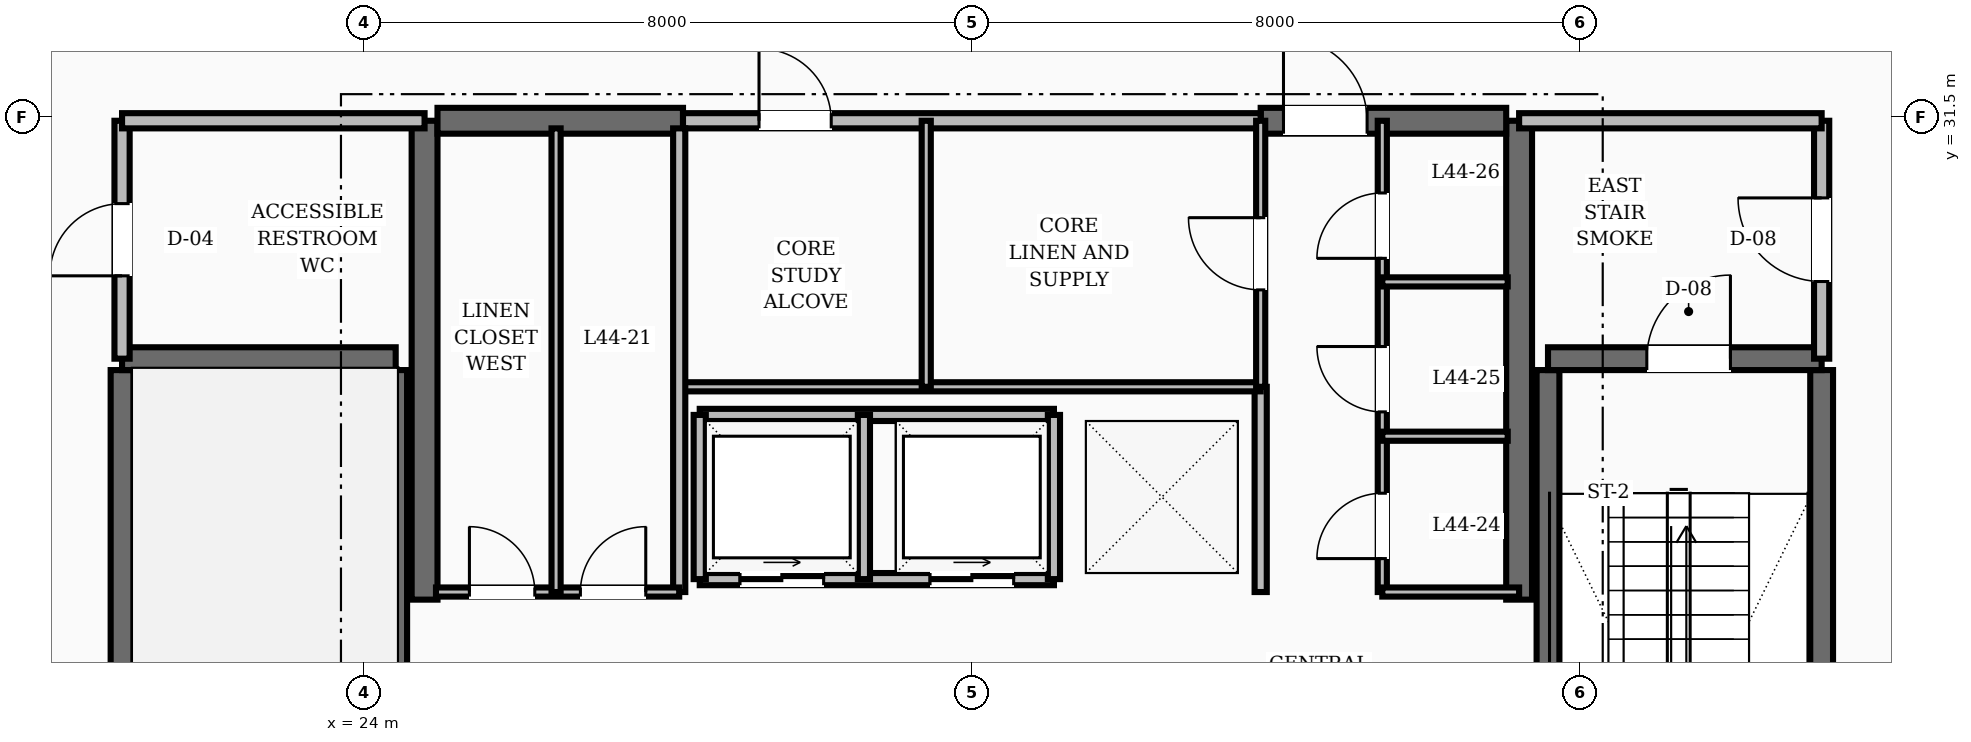
"""IFC4 building model, lengths in metres.
Left out: names, types, materials, properties, quantities, classifications, styles, units other than length and angle.
Written with IfcOpenShell. Run it as: python <this file> out.ifc"""

import sys

from ifc_helpers import new_model, si_unit, direction, frame, frame_2d, origin, place, context, subcontext, project, spatial, rectangle, extrude, element, fill, save


model = new_model("IFC4")
c1 = context("Model", 3, precision=1e-05, world=origin(), true_north=direction((0.0, 1.0)))
c2 = subcontext(c1, "Body", "Model", "MODEL_VIEW")
j1 = project(units=[si_unit("LENGTHUNIT", "METRE"), si_unit("PLANEANGLEUNIT", "RADIAN")], contexts=[c1])
p1 = place(None, origin())
s1 = spatial("IfcSite", under=j1, at=p1, CompositionType="ELEMENT")
p2 = place(p1, origin())
s2 = spatial("IfcBuilding", under=s1, at=p2, CompositionType="ELEMENT")
p3 = place(p2, frame((0.0, 0.0, 171.2)))
s3 = spatial("IfcBuildingStorey", under=s2, at=p3, CompositionType="ELEMENT", Elevation=171.2)
for number, where, z_axis, x_axis in (
    (1, (24.8, 25.15, 0.0), (0.0, 0.0, 1.0), (0.0, 1.0, 0.0)),
    (2, (39.2, 25.15, 0.0), (0.0, 0.0, 1.0), (0.0, 1.0, 0.0)),
):
    element("IfcWall", number, at=place(p3, frame(where, z_axis=z_axis, x_axis=x_axis)), inside=s3, PredefinedType="SHEAR", context=c2, shape_type="SweptSolid", body=[
        extrude(rectangle(XDim=6.3, YDim=0.34, at=frame_2d((3.15, 0.0))), origin(), (0.0, 0.0, 1.0), 3.6),
    ])
p4 = place(p3, frame((24.97, 31.45, 0.0), z_axis=(0.0, 0.0, 1.0), x_axis=(1.0, 0.0, 0.0)))
e3 = element("IfcWall", 3, at=p4, inside=s3, PredefinedType="SHEAR", context=c2, shape_type="SweptSolid", body=[
    extrude(rectangle(XDim=3.23, YDim=0.34, at=frame_2d((1.615, 0.0))), origin(), (0.0, 0.0, 1.0), 3.6),
])
p5 = place(p3, frame((35.8, 31.45, 0.0), z_axis=(0.0, 0.0, 1.0), x_axis=(1.0, 0.0, 0.0)))
e4 = element("IfcWall", 4, at=p5, inside=s3, PredefinedType="SHEAR", context=c2, shape_type="SweptSolid", body=[
    extrude(rectangle(XDim=3.23, YDim=0.34, at=frame_2d((1.615, 0.0))), origin(), (0.0, 0.0, 1.0), 3.6),
])
p6 = place(p5, frame((0.3, 0.0, 0.0)))
e5 = element("IfcOpeningElement", 5, at=p6, cuts=e4, PredefinedType="OPENING", context=c2, shape_type="SweptSolid", body=[
    extrude(rectangle(XDim=1.1, YDim=2.1, at=frame_2d((0.55, 1.05))), frame((0.0, 0.18, 0.0), z_axis=(0.0, -1.0, 0.0), x_axis=(1.0, 0.0, 0.0)), (0.0, 0.0, 1.0), 0.36),
])
for number, where, z_axis, x_axis in (
    (6, (20.82, 19.43, 0.0), (0.0, 0.0, 1.0), (0.0, 1.0, 0.0)),
    (7, (24.42, 19.43, 0.0), (0.0, 0.0, 1.0), (0.0, 1.0, 0.0)),
):
    element("IfcWall", number, at=place(p3, frame(where, z_axis=z_axis, x_axis=x_axis)), inside=s3, PredefinedType="SHEAR", context=c2, shape_type="SweptSolid", body=[
        extrude(rectangle(XDim=8.74, YDim=0.3, at=frame_2d((4.37, 0.0))), origin(), (0.0, 0.0, 1.0), 3.6),
    ])
p7 = place(p3, frame((20.82, 28.32, 0.0), z_axis=(0.0, 0.0, 1.0), x_axis=(1.0, 0.0, 0.0)))
e8 = element("IfcWall", 8, at=p7, inside=s3, PredefinedType="SHEAR", context=c2, shape_type="SweptSolid", body=[
    extrude(rectangle(XDim=3.6, YDim=0.3, at=frame_2d((1.8, 0.0))), origin(), (0.0, 0.0, 1.0), 3.6),
])
for number, where, z_axis, x_axis in (
    (9, (43.18, 19.43, 0.0), (0.0, 0.0, 1.0), (0.0, 1.0, 0.0)),
    (10, (39.58, 19.43, 0.0), (0.0, 0.0, 1.0), (0.0, 1.0, 0.0)),
):
    element("IfcWall", number, at=place(p3, frame(where, z_axis=z_axis, x_axis=x_axis)), inside=s3, PredefinedType="SHEAR", context=c2, shape_type="SweptSolid", body=[
        extrude(rectangle(XDim=8.74, YDim=0.3, at=frame_2d((4.37, 0.0))), origin(), (0.0, 0.0, 1.0), 3.6),
    ])
p8 = place(p3, frame((39.58, 28.32, 0.0), z_axis=(0.0, 0.0, 1.0), x_axis=(1.0, 0.0, 0.0)))
e11 = element("IfcWall", 11, at=p8, inside=s3, PredefinedType="SHEAR", context=c2, shape_type="SweptSolid", body=[
    extrude(rectangle(XDim=3.6, YDim=0.3, at=frame_2d((1.8, 0.0))), origin(), (0.0, 0.0, 1.0), 3.6),
])
p9 = place(p8, frame((1.3, 0.0, 0.0)))
e12 = element("IfcOpeningElement", 12, at=p9, cuts=e11, PredefinedType="OPENING", context=c2, shape_type="SweptSolid", body=[
    extrude(rectangle(XDim=1.1, YDim=2.1, at=frame_2d((0.55, 1.05))), frame((0.0, 0.16, 0.0), z_axis=(0.0, -1.0, 0.0), x_axis=(1.0, 0.0, 0.0)), (0.0, 0.0, 1.0), 0.32),
])
p10 = place(p3, frame((43.18, 28.32, 0.0), z_axis=(0.0, 0.0, 1.0), x_axis=(0.0, 1.0, 0.0)))
e13 = element("IfcWall", 13, at=p10, inside=s3, PredefinedType="SOLIDWALL", context=c2, shape_type="SweptSolid", body=[
    extrude(rectangle(XDim=3.13, YDim=0.2, at=frame_2d((1.565, 0.0))), origin(), (0.0, 0.0, 1.0), 2.8),
])
p11 = place(p10, frame((1.015, 0.0, 0.0)))
e14 = element("IfcOpeningElement", 14, at=p11, cuts=e13, PredefinedType="OPENING", context=c2, shape_type="SweptSolid", body=[
    extrude(rectangle(XDim=1.1, YDim=2.1, at=frame_2d((0.55, 1.05))), frame((0.0, 0.11, 0.0), z_axis=(0.0, -1.0, 0.0), x_axis=(1.0, 0.0, 0.0)), (0.0, 0.0, 1.0), 0.22),
])
p12 = place(p3, frame((39.2, 31.45, 0.0), z_axis=(0.0, 0.0, 1.0), x_axis=(1.0, 0.0, 0.0)))
e15 = element("IfcWall", 15, at=p12, inside=s3, PredefinedType="SOLIDWALL", context=c2, shape_type="SweptSolid", body=[
    extrude(rectangle(XDim=3.98, YDim=0.2, at=frame_2d((1.99, 0.0))), origin(), (0.0, 0.0, 1.0), 2.8),
])
p13 = place(p3, frame((20.82, 28.32, 0.0), z_axis=(0.0, 0.0, 1.0), x_axis=(0.0, 1.0, 0.0)))
e16 = element("IfcWall", 16, at=p13, inside=s3, PredefinedType="SOLIDWALL", context=c2, shape_type="SweptSolid", body=[
    extrude(rectangle(XDim=3.13, YDim=0.2, at=frame_2d((1.565, 0.0))), origin(), (0.0, 0.0, 1.0), 2.8),
])
p14 = place(p13, frame((1.09, 0.0, 0.0)))
e17 = element("IfcOpeningElement", 17, at=p14, cuts=e16, PredefinedType="OPENING", context=c2, shape_type="SweptSolid", body=[
    extrude(rectangle(XDim=0.95, YDim=2.1, at=frame_2d((0.475, 1.05))), frame((0.0, 0.11, 0.0), z_axis=(0.0, -1.0, 0.0), x_axis=(1.0, 0.0, 0.0)), (0.0, 0.0, 1.0), 0.22),
])
p15 = place(p3, frame((20.82, 31.45, 0.0), z_axis=(0.0, 0.0, 1.0), x_axis=(1.0, 0.0, 0.0)))
e18 = element("IfcWall", 18, at=p15, inside=s3, PredefinedType="SOLIDWALL", context=c2, shape_type="SweptSolid", body=[
    extrude(rectangle(XDim=3.98, YDim=0.2, at=frame_2d((1.99, 0.0))), origin(), (0.0, 0.0, 1.0), 2.8),
])
p16 = place(p3, frame((35.8, 25.25, 0.0), z_axis=(0.0, 0.0, 1.0), x_axis=(0.0, 1.0, 0.0)))
e19 = element("IfcWall", 19, at=p16, inside=s3, PredefinedType="SOLIDWALL", context=c2, shape_type="SweptSolid", body=[
    extrude(rectangle(XDim=2.7, YDim=0.16, at=frame_2d((1.35, 0.0))), origin(), (0.0, 0.0, 1.0), 2.8),
])
p17 = place(p3, frame((28.42, 25.42, 0.0), z_axis=(0.0, 0.0, 1.0), x_axis=(1.0, 0.0, 0.0)))
e20 = element("IfcWall", 20, at=p17, inside=s3, PredefinedType="SOLIDWALL", context=c2, shape_type="SweptSolid", body=[
    extrude(rectangle(XDim=4.66, YDim=0.16, at=frame_2d((2.33, 0.0))), origin(), (0.0, 0.0, 1.0), 2.8),
])
p18 = place(p17, frame((0.53, 0.0, 0.0)))
e21 = element("IfcOpeningElement", 21, at=p18, cuts=e20, PredefinedType="OPENING", context=c2, shape_type="SweptSolid", body=[
    extrude(rectangle(XDim=1.1, YDim=2.15, at=frame_2d((0.55, 1.075))), frame((0.0, 0.09, 0.0), z_axis=(0.0, -1.0, 0.0), x_axis=(1.0, 0.0, 0.0)), (0.0, 0.0, 1.0), 0.18),
])
p19 = place(p17, frame((3.03, 0.0, 0.0)))
e22 = element("IfcOpeningElement", 22, at=p19, cuts=e20, PredefinedType="OPENING", context=c2, shape_type="SweptSolid", body=[
    extrude(rectangle(XDim=1.1, YDim=2.15, at=frame_2d((0.55, 1.075))), frame((0.0, 0.09, 0.0), z_axis=(0.0, -1.0, 0.0), x_axis=(1.0, 0.0, 0.0)), (0.0, 0.0, 1.0), 0.18),
])
p20 = place(p3, frame((28.42, 27.58, 0.0), z_axis=(0.0, 0.0, 1.0), x_axis=(1.0, 0.0, 0.0)))
e23 = element("IfcWall", 23, at=p20, inside=s3, PredefinedType="SOLIDWALL", context=c2, shape_type="SweptSolid", body=[
    extrude(rectangle(XDim=4.66, YDim=0.16, at=frame_2d((2.33, 0.0))), origin(), (0.0, 0.0, 1.0), 2.8),
])
for number, where, z_axis, x_axis in (
    (24, (28.42, 25.42, 0.0), (0.0, 0.0, 1.0), (0.0, 1.0, 0.0)),
    (25, (30.58, 25.42, 0.0), (0.0, 0.0, 1.0), (0.0, 1.0, 0.0)),
    (26, (33.08, 25.42, 0.0), (0.0, 0.0, 1.0), (0.0, 1.0, 0.0)),
):
    element("IfcWall", number, at=place(p3, frame(where, z_axis=z_axis, x_axis=x_axis)), inside=s3, PredefinedType="SOLIDWALL", context=c2, shape_type="SweptSolid", body=[
        extrude(rectangle(XDim=2.16, YDim=0.16, at=frame_2d((1.08, 0.0))), origin(), (0.0, 0.0, 1.0), 2.8),
    ])
p21 = place(p3, frame((28.2, 31.45, 0.0), z_axis=(0.0, 0.0, 1.0), x_axis=(1.0, 0.0, 0.0)))
e27 = element("IfcWall", 27, at=p21, inside=s3, PredefinedType="SOLIDWALL", context=c2, shape_type="SweptSolid", body=[
    extrude(rectangle(XDim=7.6, YDim=0.2, at=frame_2d((3.8, 0.0))), origin(), (0.0, 0.0, 1.0), 2.8),
])
p22 = place(p21, frame((1.0, 0.0, 0.0)))
e28 = element("IfcOpeningElement", 28, at=p22, cuts=e27, PredefinedType="OPENING", context=c2, shape_type="SweptSolid", body=[
    extrude(rectangle(XDim=0.95, YDim=2.1, at=frame_2d((0.475, 1.05))), frame((0.0, 0.11, 0.0), z_axis=(0.0, -1.0, 0.0), x_axis=(1.0, 0.0, 0.0)), (0.0, 0.0, 1.0), 0.22),
])
p23 = place(p3, frame((28.2, 27.95, 0.0), z_axis=(0.0, 0.0, 1.0), x_axis=(1.0, 0.0, 0.0)))
e29 = element("IfcWall", 29, at=p23, inside=s3, PredefinedType="PARTITIONING", context=c2, shape_type="SweptSolid", body=[
    extrude(rectangle(XDim=7.6, YDim=0.12, at=frame_2d((3.8, 0.0))), origin(), (0.0, 0.0, 1.0), 2.8),
])
p24 = place(p3, frame((35.8, 27.95, 0.0), z_axis=(0.0, 0.0, 1.0), x_axis=(0.0, 1.0, 0.0)))
e30 = element("IfcWall", 30, at=p24, inside=s3, PredefinedType="PARTITIONING", context=c2, shape_type="SweptSolid", body=[
    extrude(rectangle(XDim=3.5, YDim=0.12, at=frame_2d((1.75, 0.0))), origin(), (0.0, 0.0, 1.0), 2.8),
])
p25 = place(p24, frame((1.275, 0.0, 0.0)))
e31 = element("IfcOpeningElement", 31, at=p25, cuts=e30, PredefinedType="OPENING", context=c2, shape_type="SweptSolid", body=[
    extrude(rectangle(XDim=0.95, YDim=2.1, at=frame_2d((0.475, 1.05))), frame((0.0, 0.07, 0.0), z_axis=(0.0, -1.0, 0.0), x_axis=(1.0, 0.0, 0.0)), (0.0, 0.0, 1.0), 0.14),
])
p26 = place(p3, frame((31.4, 27.95, 0.0), z_axis=(0.0, 0.0, 1.0), x_axis=(0.0, 1.0, 0.0)))
e32 = element("IfcWall", 32, at=p26, inside=s3, PredefinedType="PARTITIONING", context=c2, shape_type="SweptSolid", body=[
    extrude(rectangle(XDim=3.5, YDim=0.12, at=frame_2d((1.75, 0.0))), origin(), (0.0, 0.0, 1.0), 2.8),
])
p27 = place(p3, frame((28.15, 25.25, 0.0), z_axis=(0.0, 0.0, 1.0), x_axis=(0.0, 1.0, 0.0)))
e33 = element("IfcWall", 33, at=p27, inside=s3, PredefinedType="SOLIDWALL", context=c2, shape_type="SweptSolid", body=[
    extrude(rectangle(XDim=6.1, YDim=0.16, at=frame_2d((3.05, 0.0))), origin(), (0.0, 0.0, 1.0), 2.8),
])
p28 = place(p3, frame((24.95, 25.25, 0.0), z_axis=(0.0, 0.0, 1.0), x_axis=(1.0, 0.0, 0.0)))
e34 = element("IfcWall", 34, at=p28, inside=s3, PredefinedType="PARTITIONING", context=c2, shape_type="SweptSolid", body=[
    extrude(rectangle(XDim=3.2, YDim=0.12, at=frame_2d((1.6, 0.0))), origin(), (0.0, 0.0, 1.0), 2.8),
])
p29 = place(p28, frame((0.44, 0.0, 0.0)))
e35 = element("IfcOpeningElement", 35, at=p29, cuts=e34, PredefinedType="OPENING", context=c2, shape_type="SweptSolid", body=[
    extrude(rectangle(XDim=0.86, YDim=2.1, at=frame_2d((0.43, 1.05))), frame((0.0, 0.07, 0.0), z_axis=(0.0, -1.0, 0.0), x_axis=(1.0, 0.0, 0.0)), (0.0, 0.0, 1.0), 0.14),
])
p30 = place(p28, frame((1.9, 0.0, 0.0)))
e36 = element("IfcOpeningElement", 36, at=p30, cuts=e34, PredefinedType="OPENING", context=c2, shape_type="SweptSolid", body=[
    extrude(rectangle(XDim=0.86, YDim=2.1, at=frame_2d((0.43, 1.05))), frame((0.0, 0.07, 0.0), z_axis=(0.0, -1.0, 0.0), x_axis=(1.0, 0.0, 0.0)), (0.0, 0.0, 1.0), 0.14),
])
p31 = place(p3, frame((37.4, 25.25, 0.0), z_axis=(0.0, 0.0, 1.0), x_axis=(0.0, 1.0, 0.0)))
e37 = element("IfcWall", 37, at=p31, inside=s3, PredefinedType="PARTITIONING", context=c2, shape_type="SweptSolid", body=[
    extrude(rectangle(XDim=6.2, YDim=0.12, at=frame_2d((3.1, 0.0))), origin(), (0.0, 0.0, 1.0), 2.8),
])
p32 = place(p31, frame((0.44, 0.0, 0.0)))
e38 = element("IfcOpeningElement", 38, at=p32, cuts=e37, PredefinedType="OPENING", context=c2, shape_type="SweptSolid", body=[
    extrude(rectangle(XDim=0.86, YDim=2.1, at=frame_2d((0.43, 1.05))), frame((0.0, 0.07, 0.0), z_axis=(0.0, -1.0, 0.0), x_axis=(1.0, 0.0, 0.0)), (0.0, 0.0, 1.0), 0.14),
])
p33 = place(p31, frame((2.37, 0.0, 0.0)))
e39 = element("IfcOpeningElement", 39, at=p33, cuts=e37, PredefinedType="OPENING", context=c2, shape_type="SweptSolid", body=[
    extrude(rectangle(XDim=0.86, YDim=2.1, at=frame_2d((0.43, 1.05))), frame((0.0, 0.07, 0.0), z_axis=(0.0, -1.0, 0.0), x_axis=(1.0, 0.0, 0.0)), (0.0, 0.0, 1.0), 0.14),
])
p34 = place(p31, frame((4.39, 0.0, 0.0)))
e40 = element("IfcOpeningElement", 40, at=p34, cuts=e37, PredefinedType="OPENING", context=c2, shape_type="SweptSolid", body=[
    extrude(rectangle(XDim=0.86, YDim=2.1, at=frame_2d((0.43, 1.05))), frame((0.0, 0.07, 0.0), z_axis=(0.0, -1.0, 0.0), x_axis=(1.0, 0.0, 0.0)), (0.0, 0.0, 1.0), 0.14),
])
p35 = place(p3, frame((37.4, 25.25, 0.0), z_axis=(0.0, 0.0, 1.0), x_axis=(1.0, 0.0, 0.0)))
e41 = element("IfcWall", 41, at=p35, inside=s3, PredefinedType="PARTITIONING", context=c2, shape_type="SweptSolid", body=[
    extrude(rectangle(XDim=1.8, YDim=0.12, at=frame_2d((0.9, 0.0))), origin(), (0.0, 0.0, 1.0), 2.8),
])
p36 = place(p3, frame((26.53, 25.25, 0.0), z_axis=(0.0, 0.0, 1.0), x_axis=(0.0, 1.0, 0.0)))
e42 = element("IfcWall", 42, at=p36, inside=s3, PredefinedType="PARTITIONING", context=c2, shape_type="SweptSolid", body=[
    extrude(rectangle(XDim=6.1, YDim=0.12, at=frame_2d((3.05, 0.0))), origin(), (0.0, 0.0, 1.0), 2.8),
])
for number, where, z_axis, x_axis in (
    (43, (37.4, 27.3, 0.0), (0.0, 0.0, 1.0), (1.0, 0.0, 0.0)),
    (44, (37.4, 29.33, 0.0), (0.0, 0.0, 1.0), (1.0, 0.0, 0.0)),
):
    element("IfcWall", number, at=place(p3, frame(where, z_axis=z_axis, x_axis=x_axis)), inside=s3, PredefinedType="PARTITIONING", context=c2, shape_type="SweptSolid", body=[
        extrude(rectangle(XDim=1.65, YDim=0.12, at=frame_2d((0.825, 0.0))), origin(), (0.0, 0.0, 1.0), 2.8),
    ])
p37 = place(p9, origin())
e45 = element("IfcDoor", 45, at=p37, inside=s3, OperationType="SINGLE_SWING_RIGHT", PredefinedType="DOOR", context=c2, shape_type="SweptSolid", body=[
    extrude(rectangle(XDim=1.1, YDim=2.1, at=frame_2d((0.55, 1.05))), frame((0.0, 0.025, 0.0), z_axis=(0.0, -1.0, 0.0), x_axis=(1.0, 0.0, 0.0)), (0.0, 0.0, 1.0), 0.05),
])
fill(e12, e45)
p38 = place(p11, origin())
e46 = element("IfcDoor", 46, at=p38, inside=s3, OperationType="SINGLE_SWING_RIGHT", PredefinedType="DOOR", context=c2, shape_type="SweptSolid", body=[
    extrude(rectangle(XDim=1.1, YDim=2.1, at=frame_2d((0.55, 1.05))), frame((0.0, 0.025, 0.0), z_axis=(0.0, -1.0, 0.0), x_axis=(1.0, 0.0, 0.0)), (0.0, 0.0, 1.0), 0.05),
])
fill(e14, e46)
p39 = place(p14, origin())
e47 = element("IfcDoor", 47, at=p39, inside=s3, OperationType="SINGLE_SWING_LEFT", PredefinedType="DOOR", context=c2, shape_type="SweptSolid", body=[
    extrude(rectangle(XDim=0.95, YDim=2.1, at=frame_2d((0.475, 1.05))), frame((0.0, 0.025, 0.0), z_axis=(0.0, -1.0, 0.0), x_axis=(1.0, 0.0, 0.0)), (0.0, 0.0, 1.0), 0.05),
])
fill(e17, e47)
p40 = place(p6, origin())
e48 = element("IfcDoor", 48, at=p40, inside=s3, OperationType="SINGLE_SWING_LEFT", PredefinedType="DOOR", context=c2, shape_type="SweptSolid", body=[
    extrude(rectangle(XDim=1.1, YDim=2.1, at=frame_2d((0.55, 1.05))), frame((0.0, 0.025, 0.0), z_axis=(0.0, -1.0, 0.0), x_axis=(1.0, 0.0, 0.0)), (0.0, 0.0, 1.0), 0.05),
])
fill(e5, e48)
p41 = place(p18, origin())
e49 = element("IfcDoor", 49, at=p41, inside=s3, OperationType="SLIDING_TO_RIGHT", PredefinedType="DOOR", context=c2, shape_type="SweptSolid", body=[
    extrude(rectangle(XDim=1.1, YDim=2.15, at=frame_2d((0.55, 1.075))), frame((0.0, 0.025, 0.0), z_axis=(0.0, -1.0, 0.0), x_axis=(1.0, 0.0, 0.0)), (0.0, 0.0, 1.0), 0.05),
])
fill(e21, e49)
p42 = place(p19, origin())
e50 = element("IfcDoor", 50, at=p42, inside=s3, OperationType="SLIDING_TO_RIGHT", PredefinedType="DOOR", context=c2, shape_type="SweptSolid", body=[
    extrude(rectangle(XDim=1.1, YDim=2.15, at=frame_2d((0.55, 1.075))), frame((0.0, 0.025, 0.0), z_axis=(0.0, -1.0, 0.0), x_axis=(1.0, 0.0, 0.0)), (0.0, 0.0, 1.0), 0.05),
])
fill(e22, e50)
p43 = place(p22, origin())
e51 = element("IfcDoor", 51, at=p43, inside=s3, OperationType="SINGLE_SWING_LEFT", PredefinedType="DOOR", context=c2, shape_type="SweptSolid", body=[
    extrude(rectangle(XDim=0.95, YDim=2.1, at=frame_2d((0.475, 1.05))), frame((0.0, 0.025, 0.0), z_axis=(0.0, -1.0, 0.0), x_axis=(1.0, 0.0, 0.0)), (0.0, 0.0, 1.0), 0.05),
])
fill(e28, e51)
p44 = place(p25, origin())
e52 = element("IfcDoor", 52, at=p44, inside=s3, OperationType="SINGLE_SWING_RIGHT", PredefinedType="DOOR", context=c2, shape_type="SweptSolid", body=[
    extrude(rectangle(XDim=0.95, YDim=2.1, at=frame_2d((0.475, 1.05))), frame((0.0, 0.025, 0.0), z_axis=(0.0, -1.0, 0.0), x_axis=(1.0, 0.0, 0.0)), (0.0, 0.0, 1.0), 0.05),
])
fill(e31, e52)
p45 = place(p29, origin())
e53 = element("IfcDoor", 53, at=p45, inside=s3, OperationType="SINGLE_SWING_LEFT", PredefinedType="DOOR", context=c2, shape_type="SweptSolid", body=[
    extrude(rectangle(XDim=0.86, YDim=2.1, at=frame_2d((0.43, 1.05))), frame((0.0, 0.025, 0.0), z_axis=(0.0, -1.0, 0.0), x_axis=(1.0, 0.0, 0.0)), (0.0, 0.0, 1.0), 0.05),
])
fill(e35, e53)
p46 = place(p30, origin())
e54 = element("IfcDoor", 54, at=p46, inside=s3, OperationType="SINGLE_SWING_RIGHT", PredefinedType="DOOR", context=c2, shape_type="SweptSolid", body=[
    extrude(rectangle(XDim=0.86, YDim=2.1, at=frame_2d((0.43, 1.05))), frame((0.0, 0.025, 0.0), z_axis=(0.0, -1.0, 0.0), x_axis=(1.0, 0.0, 0.0)), (0.0, 0.0, 1.0), 0.05),
])
fill(e36, e54)
p47 = place(p32, origin())
e55 = element("IfcDoor", 55, at=p47, inside=s3, OperationType="SINGLE_SWING_LEFT", PredefinedType="DOOR", context=c2, shape_type="SweptSolid", body=[
    extrude(rectangle(XDim=0.86, YDim=2.1, at=frame_2d((0.43, 1.05))), frame((0.0, 0.025, 0.0), z_axis=(0.0, -1.0, 0.0), x_axis=(1.0, 0.0, 0.0)), (0.0, 0.0, 1.0), 0.05),
])
fill(e38, e55)
p48 = place(p33, origin())
e56 = element("IfcDoor", 56, at=p48, inside=s3, OperationType="SINGLE_SWING_RIGHT", PredefinedType="DOOR", context=c2, shape_type="SweptSolid", body=[
    extrude(rectangle(XDim=0.86, YDim=2.1, at=frame_2d((0.43, 1.05))), frame((0.0, 0.025, 0.0), z_axis=(0.0, -1.0, 0.0), x_axis=(1.0, 0.0, 0.0)), (0.0, 0.0, 1.0), 0.05),
])
fill(e39, e56)
p49 = place(p34, origin())
e57 = element("IfcDoor", 57, at=p49, inside=s3, OperationType="SINGLE_SWING_LEFT", PredefinedType="DOOR", context=c2, shape_type="SweptSolid", body=[
    extrude(rectangle(XDim=0.86, YDim=2.1, at=frame_2d((0.43, 1.05))), frame((0.0, 0.025, 0.0), z_axis=(0.0, -1.0, 0.0), x_axis=(1.0, 0.0, 0.0)), (0.0, 0.0, 1.0), 0.05),
])
fill(e40, e57)
save(model, sys.argv[1])
